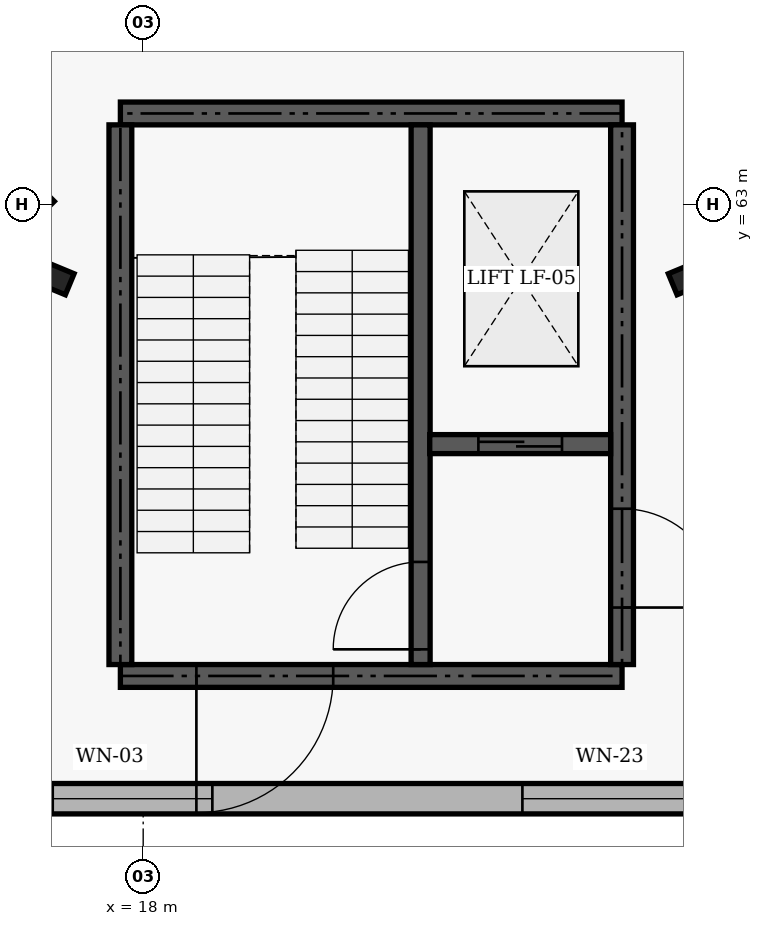
"""IFC4 building model, lengths in metres.
Left out: names, types, materials, properties, quantities, classifications, styles, units other than length and angle.
Written with IfcOpenShell. Run it as: python <this file> out.ifc"""

import sys

from ifc_helpers import new_model, si_unit, direction, frame, frame_2d, origin, origin_2d, place, context, subcontext, project, spatial, rectangle, i_section, extrude, element, fill, save


model = new_model("IFC4")
c1 = context("Model", 3, precision=1e-05, world=origin(), true_north=direction((0.0, 1.0)))
c2 = subcontext(c1, "Body", "Model", "MODEL_VIEW")
j1 = project(units=[si_unit("LENGTHUNIT", "METRE"), si_unit("PLANEANGLEUNIT", "RADIAN")], contexts=[c1])
p1 = place(None, origin())
s1 = spatial("IfcSite", under=j1, at=p1, CompositionType="ELEMENT")
p2 = place(p1, origin())
s2 = spatial("IfcBuilding", under=s1, at=p2, CompositionType="ELEMENT")
p3 = place(p2, origin())
s3 = spatial("IfcBuildingStorey", under=s2, at=p3, CompositionType="ELEMENT", Elevation=0.0)
for number, where, z_axis, x_axis in (
    (1, (16.867, 62.022, 0.0), (0.0, 0.0, 1.0), (-0.383, -0.924, 0.0)),
    (2, (25.133, 62.022, 0.0), (0.0, 0.0, 1.0), (0.383, -0.924, 0.0)),
):
    element("IfcColumn", number, at=place(p3, frame(where, z_axis=z_axis, x_axis=x_axis)), inside=s3, PredefinedType="COLUMN", context=c2, shape_type="SweptSolid", body=[
        extrude(i_section(OverallWidth=0.3, OverallDepth=0.36, WebThickness=0.012, FlangeThickness=0.022, FilletRadius=0.027, at=origin_2d()), origin(), (0.0, 0.0, 1.0), 5.4),
    ])
p4 = place(p3, frame((14.175, 55.185, 0.0), z_axis=(0.0, 0.0, 1.0), x_axis=(1.0, 0.0, 0.0)))
e3 = element("IfcWall", 3, at=p4, inside=s3, PredefinedType="SOLIDWALL", context=c2, shape_type="SweptSolid", body=[
    extrude(rectangle(XDim=13.65, YDim=0.4, at=frame_2d((6.825, 0.0))), origin(), (0.0, 0.0, 1.0), 4.35),
])
p5 = place(p4, frame((2.635, 0.0, 0.95)))
e4 = element("IfcOpeningElement", 4, at=p5, cuts=e3, PredefinedType="OPENING", context=c2, shape_type="SweptSolid", body=[
    extrude(rectangle(XDim=2.1, YDim=2.1, at=frame_2d((1.05, 1.05))), frame((0.0, 0.21, 0.0), z_axis=(0.0, -1.0, 0.0), x_axis=(1.0, 0.0, 0.0)), (0.0, 0.0, 1.0), 0.42),
])
p6 = place(p4, frame((8.814, 0.0, 0.95)))
e5 = element("IfcOpeningElement", 5, at=p6, cuts=e3, PredefinedType="OPENING", context=c2, shape_type="SweptSolid", body=[
    extrude(rectangle(XDim=2.3, YDim=1.65, at=frame_2d((1.15, 0.825))), frame((0.0, 0.21, 0.0), z_axis=(0.0, -1.0, 0.0), x_axis=(1.0, 0.0, 0.0)), (0.0, 0.0, 1.0), 0.42),
])
p7 = place(p3, frame((17.7, 56.8, 0.0), z_axis=(0.0, 0.0, 1.0), x_axis=(1.0, 0.0, 0.0)))
e6 = element("IfcWall", 6, at=p7, inside=s3, PredefinedType="SHEAR", context=c2, shape_type="SweptSolid", body=[
    extrude(rectangle(XDim=6.6, YDim=0.3, at=frame_2d((3.3, 0.0))), origin(), (0.0, 0.0, 1.0), 5.4),
])
p8 = place(p7, frame((1.0, 0.0, 0.0)))
e7 = element("IfcOpeningElement", 7, at=p8, cuts=e6, PredefinedType="OPENING", context=c2, shape_type="SweptSolid", body=[
    extrude(rectangle(XDim=1.8, YDim=2.15, at=frame_2d((0.9, 1.075))), frame((0.0, 0.16, 0.0), z_axis=(0.0, -1.0, 0.0), x_axis=(1.0, 0.0, 0.0)), (0.0, 0.0, 1.0), 0.32),
])
p9 = place(p3, frame((17.7, 64.2, 0.0), z_axis=(0.0, 0.0, 1.0), x_axis=(1.0, 0.0, 0.0)))
e8 = element("IfcWall", 8, at=p9, inside=s3, PredefinedType="SHEAR", context=c2, shape_type="SweptSolid", body=[
    extrude(rectangle(XDim=6.6, YDim=0.3, at=frame_2d((3.3, 0.0))), origin(), (0.0, 0.0, 1.0), 5.4),
])
p10 = place(p3, frame((17.7, 56.95, 0.0), z_axis=(0.0, 0.0, 1.0), x_axis=(0.0, 1.0, 0.0)))
e9 = element("IfcWall", 9, at=p10, inside=s3, PredefinedType="SHEAR", context=c2, shape_type="SweptSolid", body=[
    extrude(rectangle(XDim=7.1, YDim=0.3, at=frame_2d((3.55, 0.0))), origin(), (0.0, 0.0, 1.0), 5.4),
])
p11 = place(p3, frame((24.3, 56.95, 0.0), z_axis=(0.0, 0.0, 1.0), x_axis=(0.0, 1.0, 0.0)))
e10 = element("IfcWall", 10, at=p11, inside=s3, PredefinedType="SHEAR", context=c2, shape_type="SweptSolid", body=[
    extrude(rectangle(XDim=7.1, YDim=0.3, at=frame_2d((3.55, 0.0))), origin(), (0.0, 0.0, 1.0), 5.4),
])
p12 = place(p11, frame((0.75, 0.0, 0.0)))
e11 = element("IfcOpeningElement", 11, at=p12, cuts=e10, PredefinedType="OPENING", context=c2, shape_type="SweptSolid", body=[
    extrude(rectangle(XDim=1.3, YDim=2.15, at=frame_2d((0.65, 1.075))), frame((0.0, 0.16, 0.0), z_axis=(0.0, -1.0, 0.0), x_axis=(1.0, 0.0, 0.0)), (0.0, 0.0, 1.0), 0.32),
])
p13 = place(p3, frame((21.65, 56.95, 0.0), z_axis=(0.0, 0.0, 1.0), x_axis=(0.0, 1.0, 0.0)))
e12 = element("IfcWall", 12, at=p13, inside=s3, PredefinedType="SHEAR", context=c2, shape_type="SweptSolid", body=[
    extrude(rectangle(XDim=7.1, YDim=0.25, at=frame_2d((3.55, 0.0))), origin(), (0.0, 0.0, 1.0), 5.4),
])
p14 = place(p13, frame((0.2, 0.0, 0.0)))
e13 = element("IfcOpeningElement", 13, at=p14, cuts=e12, PredefinedType="OPENING", context=c2, shape_type="SweptSolid", body=[
    extrude(rectangle(XDim=1.15, YDim=2.15, at=frame_2d((0.575, 1.075))), frame((0.0, 0.135, 0.0), z_axis=(0.0, -1.0, 0.0), x_axis=(1.0, 0.0, 0.0)), (0.0, 0.0, 1.0), 0.27),
])
p15 = place(p3, frame((21.77, 59.85, 0.0), z_axis=(0.0, 0.0, 1.0), x_axis=(1.0, 0.0, 0.0)))
e14 = element("IfcWall", 14, at=p15, inside=s3, PredefinedType="SHEAR", context=c2, shape_type="SweptSolid", body=[
    extrude(rectangle(XDim=2.38, YDim=0.25, at=frame_2d((1.19, 0.0))), origin(), (0.0, 0.0, 1.0), 5.4),
])
p16 = place(p15, frame((0.64, 0.0, 0.0)))
e15 = element("IfcOpeningElement", 15, at=p16, cuts=e14, PredefinedType="OPENING", context=c2, shape_type="SweptSolid", body=[
    extrude(rectangle(XDim=1.1, YDim=2.15, at=frame_2d((0.55, 1.075))), frame((0.0, 0.135, 0.0), z_axis=(0.0, -1.0, 0.0), x_axis=(1.0, 0.0, 0.0)), (0.0, 0.0, 1.0), 0.27),
])
p17 = place(p3, frame((11.975, 67.761, 0.0), z_axis=(0.0, 0.0, 1.0), x_axis=(0.707106781187, -0.707106781187, 0.0)))
e16 = element("IfcWall", 16, at=p17, inside=s3, PredefinedType="PARTITIONING", context=c2, shape_type="SweptSolid", body=[
    extrude(rectangle(XDim=6.768, YDim=0.195, at=frame_2d((3.384, 0.0))), origin(), (0.0, 0.0, 1.0), 4.3),
])
p18 = place(p17, frame((2.559, 0.0, 0.0)))
e17 = element("IfcOpeningElement", 17, at=p18, cuts=e16, PredefinedType="OPENING", context=c2, shape_type="SweptSolid", body=[
    extrude(rectangle(XDim=1.65, YDim=2.25, at=frame_2d((0.825, 1.125))), frame((0.0, 0.107, 0.0), z_axis=(0.0, -1.0, 0.0), x_axis=(1.0, 0.0, 0.0)), (0.0, 0.0, 1.0), 0.215),
])
p19 = place(p5, origin())
e18 = element("IfcWindow", 18, at=p19, inside=s3, PartitioningType="SINGLE_PANEL", PredefinedType="WINDOW", context=c2, shape_type="SweptSolid", body=[
    extrude(rectangle(XDim=2.1, YDim=2.1, at=frame_2d((1.05, 1.05))), frame((0.0, 0.03, 0.0), z_axis=(0.0, -1.0, 0.0), x_axis=(1.0, 0.0, 0.0)), (0.0, 0.0, 1.0), 0.06),
])
fill(e4, e18)
p20 = place(p6, origin())
e19 = element("IfcWindow", 19, at=p20, inside=s3, PartitioningType="SINGLE_PANEL", PredefinedType="WINDOW", context=c2, shape_type="SweptSolid", body=[
    extrude(rectangle(XDim=2.3, YDim=1.65, at=frame_2d((1.15, 0.825))), frame((0.0, 0.03, 0.0), z_axis=(0.0, -1.0, 0.0), x_axis=(1.0, 0.0, 0.0)), (0.0, 0.0, 1.0), 0.06),
])
fill(e5, e19)
p21 = place(p12, frame((1.3, 0.0, 0.0), z_axis=(0.0, 0.0, 1.0), x_axis=(-1.0, 0.0, 0.0)))
e20 = element("IfcDoor", 20, at=p21, inside=s3, OperationType="DOUBLE_DOOR_SINGLE_SWING", PredefinedType="DOOR", context=c2, shape_type="SweptSolid", body=[
    extrude(rectangle(XDim=1.3, YDim=2.15, at=frame_2d((0.65, 1.075))), frame((0.0, 0.025, 0.0), z_axis=(0.0, -1.0, 0.0), x_axis=(1.0, 0.0, 0.0)), (0.0, 0.0, 1.0), 0.05),
])
fill(e11, e20)
p22 = place(p14, origin())
e21 = element("IfcDoor", 21, at=p22, inside=s3, OperationType="SINGLE_SWING_LEFT", PredefinedType="DOOR", context=c2, shape_type="SweptSolid", body=[
    extrude(rectangle(XDim=1.15, YDim=2.15, at=frame_2d((0.575, 1.075))), frame((0.0, 0.025, 0.0), z_axis=(0.0, -1.0, 0.0), x_axis=(1.0, 0.0, 0.0)), (0.0, 0.0, 1.0), 0.05),
])
fill(e13, e21)
p23 = place(p8, frame((1.8, 0.0, 0.0), z_axis=(0.0, 0.0, 1.0), x_axis=(-1.0, 0.0, 0.0)))
e22 = element("IfcDoor", 22, at=p23, inside=s3, OperationType="DOUBLE_DOOR_SINGLE_SWING", PredefinedType="DOOR", context=c2, shape_type="SweptSolid", body=[
    extrude(rectangle(XDim=1.8, YDim=2.15, at=frame_2d((0.9, 1.075))), frame((0.0, 0.025, 0.0), z_axis=(0.0, -1.0, 0.0), x_axis=(1.0, 0.0, 0.0)), (0.0, 0.0, 1.0), 0.05),
])
fill(e7, e22)
p24 = place(p16, origin())
e23 = element("IfcDoor", 23, at=p24, inside=s3, OperationType="SLIDING_TO_LEFT", PredefinedType="DOOR", context=c2, shape_type="SweptSolid", body=[
    extrude(rectangle(XDim=1.1, YDim=2.15, at=frame_2d((0.55, 1.075))), frame((0.0, 0.025, 0.0), z_axis=(0.0, -1.0, 0.0), x_axis=(1.0, 0.0, 0.0)), (0.0, 0.0, 1.0), 0.05),
])
fill(e15, e23)
save(model, sys.argv[1])
